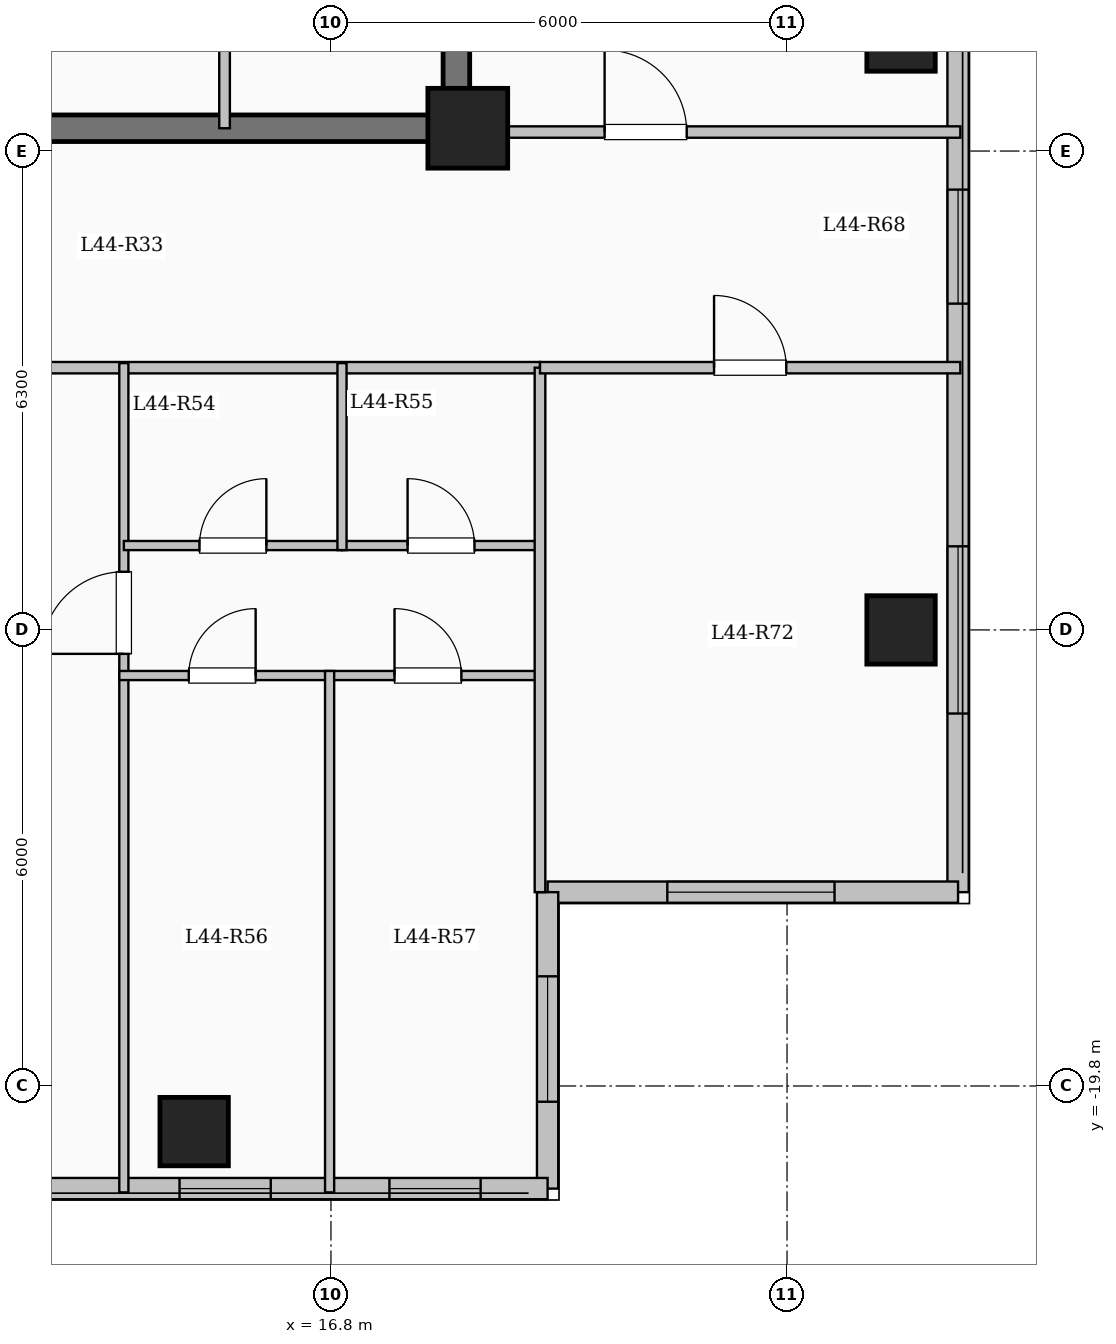
"""IFC4 building model, lengths in metres.
Left out: names, types, materials, properties, quantities, classifications, styles, units other than length and angle.
Written with IfcOpenShell. Run it as: python <this file> out.ifc"""

import sys

from ifc_helpers import new_model, si_unit, direction, frame, frame_2d, origin, origin_2d, place, context, subcontext, project, spatial, rectangle, extrude, element, fill, save


model = new_model("IFC4")
c1 = context("Model", 3, precision=1e-05, world=origin(), true_north=direction((0.0, 1.0)))
c2 = subcontext(c1, "Body", "Model", "MODEL_VIEW")
j1 = project(units=[si_unit("LENGTHUNIT", "METRE"), si_unit("PLANEANGLEUNIT", "RADIAN")], contexts=[c1])
p1 = place(None, origin())
s1 = spatial("IfcSite", under=j1, at=p1, CompositionType="ELEMENT")
p2 = place(p1, origin())
s2 = spatial("IfcBuilding", under=s1, at=p2, CompositionType="ELEMENT")
p3 = place(p2, frame((0.0, 0.0, 162.75)))
s3 = spatial("IfcBuildingStorey", under=s2, at=p3, CompositionType="ELEMENT", Elevation=162.75)
p4 = place(p3, frame((18.6, -7.2, 0.0), z_axis=(0.0, 0.0, 1.0), x_axis=(1.0, 0.0, 0.0)))
e1 = element("IfcColumn", 1, at=p4, inside=s3, PredefinedType="COLUMN", context=c2, shape_type="SweptSolid", body=[
    extrude(rectangle(XDim=1.05, YDim=1.05, at=origin_2d()), origin(), (0.0, 0.0, 1.0), 3.35),
])
for number, where, z_axis, x_axis in (
    (2, (15.0, -20.4, 0.0), (0.0, 0.0, 1.0), (1.0, 0.0, 0.0)),
    (3, (24.3, -13.8, 0.0), (0.0, 0.0, 1.0), (1.0, 0.0, 0.0)),
    (4, (24.3, -6.0, 0.0), (0.0, 0.0, 1.0), (1.0, 0.0, 0.0)),
):
    element("IfcColumn", number, at=place(p3, frame(where, z_axis=z_axis, x_axis=x_axis)), inside=s3, PredefinedType="COLUMN", context=c2, shape_type="SweptSolid", body=[
        extrude(rectangle(XDim=0.9, YDim=0.9, at=origin_2d()), origin(), (0.0, 0.0, 1.0), 3.35),
    ])
p5 = place(p3, frame((25.05, 17.25, 0.0), z_axis=(0.0, 0.0, 1.0), x_axis=(0.0, -1.0, 0.0)))
e5 = element("IfcWall", 5, at=p5, inside=s3, PredefinedType="SOLIDWALL", context=c2, shape_type="SweptSolid", body=[
    extrude(rectangle(XDim=34.5, YDim=0.28, at=frame_2d((17.25, 0.0))), origin(), (0.0, 0.0, 1.0), 3.1),
])
p6 = place(p5, frame((1.375, 0.0, 0.9)))
e6 = element("IfcOpeningElement", 6, at=p6, cuts=e5, PredefinedType="OPENING", context=c2, shape_type="SweptSolid", body=[
    extrude(rectangle(XDim=2.0, YDim=1.7, at=frame_2d((1.0, 0.85))), frame((0.0, 0.15, 0.0), z_axis=(0.0, -1.0, 0.0), x_axis=(1.0, 0.0, 0.0)), (0.0, 0.0, 1.0), 0.3),
])
p7 = place(p5, frame((5.125, 0.0, 0.95)))
e7 = element("IfcOpeningElement", 7, at=p7, cuts=e5, PredefinedType="OPENING", context=c2, shape_type="SweptSolid", body=[
    extrude(rectangle(XDim=1.0, YDim=1.5, at=frame_2d((0.5, 0.75))), frame((0.0, 0.15, 0.0), z_axis=(0.0, -1.0, 0.0), x_axis=(1.0, 0.0, 0.0)), (0.0, 0.0, 1.0), 0.3),
])
p8 = place(p5, frame((14.5, 0.0, 0.9)))
e8 = element("IfcOpeningElement", 8, at=p8, cuts=e5, PredefinedType="OPENING", context=c2, shape_type="SweptSolid", body=[
    extrude(rectangle(XDim=2.0, YDim=1.7, at=frame_2d((1.0, 0.85))), frame((0.0, 0.15, 0.0), z_axis=(0.0, -1.0, 0.0), x_axis=(1.0, 0.0, 0.0)), (0.0, 0.0, 1.0), 0.3),
])
p9 = place(p5, frame((25.258, 0.0, 0.9)))
e9 = element("IfcOpeningElement", 9, at=p9, cuts=e5, PredefinedType="OPENING", context=c2, shape_type="SweptSolid", body=[
    extrude(rectangle(XDim=1.5, YDim=1.65, at=frame_2d((0.75, 0.825))), frame((0.0, 0.15, 0.0), z_axis=(0.0, -1.0, 0.0), x_axis=(1.0, 0.0, 0.0)), (0.0, 0.0, 1.0), 0.3),
])
p10 = place(p5, frame((29.95, 0.0, 0.9)))
e10 = element("IfcOpeningElement", 10, at=p10, cuts=e5, PredefinedType="OPENING", context=c2, shape_type="SweptSolid", body=[
    extrude(rectangle(XDim=2.2, YDim=1.75, at=frame_2d((1.1, 0.875))), frame((0.0, 0.15, 0.0), z_axis=(0.0, -1.0, 0.0), x_axis=(1.0, 0.0, 0.0)), (0.0, 0.0, 1.0), 0.3),
])
p11 = place(p3, frame((25.05, -17.25, 0.0), z_axis=(0.0, 0.0, 1.0), x_axis=(-1.0, 0.0, 0.0)))
e11 = element("IfcWall", 11, at=p11, inside=s3, PredefinedType="SOLIDWALL", context=c2, shape_type="SweptSolid", body=[
    extrude(rectangle(XDim=5.4, YDim=0.28, at=frame_2d((2.7, 0.0))), origin(), (0.0, 0.0, 1.0), 3.1),
])
p12 = place(p11, frame((1.625, 0.0, 0.9)))
e12 = element("IfcOpeningElement", 12, at=p12, cuts=e11, PredefinedType="OPENING", context=c2, shape_type="SweptSolid", body=[
    extrude(rectangle(XDim=2.2, YDim=1.75, at=frame_2d((1.1, 0.875))), frame((0.0, 0.15, 0.0), z_axis=(0.0, -1.0, 0.0), x_axis=(1.0, 0.0, 0.0)), (0.0, 0.0, 1.0), 0.3),
])
p13 = place(p3, frame((19.65, -17.25, 0.0), z_axis=(0.0, 0.0, 1.0), x_axis=(0.0, -1.0, 0.0)))
e13 = element("IfcWall", 13, at=p13, inside=s3, PredefinedType="SOLIDWALL", context=c2, shape_type="SweptSolid", body=[
    extrude(rectangle(XDim=3.9, YDim=0.28, at=frame_2d((1.95, 0.0))), origin(), (0.0, 0.0, 1.0), 3.1),
])
p14 = place(p13, frame((1.107, 0.0, 0.9)))
e14 = element("IfcOpeningElement", 14, at=p14, cuts=e13, PredefinedType="OPENING", context=c2, shape_type="SweptSolid", body=[
    extrude(rectangle(XDim=1.65, YDim=1.6, at=frame_2d((0.825, 0.8))), frame((0.0, 0.15, 0.0), z_axis=(0.0, -1.0, 0.0), x_axis=(1.0, 0.0, 0.0)), (0.0, 0.0, 1.0), 0.3),
])
p15 = place(p3, frame((19.65, -21.15, 0.0), z_axis=(0.0, 0.0, 1.0), x_axis=(-1.0, 0.0, 0.0)))
e15 = element("IfcWall", 15, at=p15, inside=s3, PredefinedType="SOLIDWALL", context=c2, shape_type="SweptSolid", body=[
    extrude(rectangle(XDim=12.3, YDim=0.28, at=frame_2d((6.15, 0.0))), origin(), (0.0, 0.0, 1.0), 3.1),
])
p16 = place(p15, frame((0.881, 0.0, 0.95)))
e16 = element("IfcOpeningElement", 16, at=p16, cuts=e15, PredefinedType="OPENING", context=c2, shape_type="SweptSolid", body=[
    extrude(rectangle(XDim=1.2, YDim=1.5, at=frame_2d((0.6, 0.75))), frame((0.0, 0.15, 0.0), z_axis=(0.0, -1.0, 0.0), x_axis=(1.0, 0.0, 0.0)), (0.0, 0.0, 1.0), 0.3),
])
p17 = place(p15, frame((3.642, 0.0, 0.95)))
e17 = element("IfcOpeningElement", 17, at=p17, cuts=e15, PredefinedType="OPENING", context=c2, shape_type="SweptSolid", body=[
    extrude(rectangle(XDim=1.2, YDim=1.5, at=frame_2d((0.6, 0.75))), frame((0.0, 0.15, 0.0), z_axis=(0.0, -1.0, 0.0), x_axis=(1.0, 0.0, 0.0)), (0.0, 0.0, 1.0), 0.3),
])
p18 = place(p15, frame((7.234, 0.0, 0.9)))
e18 = element("IfcOpeningElement", 18, at=p18, cuts=e15, PredefinedType="OPENING", context=c2, shape_type="SweptSolid", body=[
    extrude(rectangle(XDim=2.2, YDim=1.75, at=frame_2d((1.1, 0.875))), frame((0.0, 0.15, 0.0), z_axis=(0.0, -1.0, 0.0), x_axis=(1.0, 0.0, 0.0)), (0.0, 0.0, 1.0), 0.3),
])
p19 = place(p15, frame((11.303, 0.0, 0.95)))
e19 = element("IfcOpeningElement", 19, at=p19, cuts=e15, PredefinedType="OPENING", context=c2, shape_type="SweptSolid", body=[
    extrude(rectangle(XDim=0.85, YDim=1.5, at=frame_2d((0.425, 0.75))), frame((0.0, 0.15, 0.0), z_axis=(0.0, -1.0, 0.0), x_axis=(1.0, 0.0, 0.0)), (0.0, 0.0, 1.0), 0.3),
])
p20 = place(p3, frame((18.45, -7.375, 0.0), z_axis=(0.0, 0.0, 1.0), x_axis=(0.0, 1.0, 0.0)))
e20 = element("IfcWall", 20, at=p20, inside=s3, PredefinedType="SHEAR", context=c2, shape_type="SweptSolid", body=[
    extrude(rectangle(XDim=14.05, YDim=0.35, at=frame_2d((7.025, 0.0))), origin(), (0.0, 0.0, 1.0), 3.35),
])
p21 = place(p3, frame((10.075, -7.2, 0.0), z_axis=(0.0, 0.0, 1.0), x_axis=(1.0, 0.0, 0.0)))
e21 = element("IfcWall", 21, at=p21, inside=s3, PredefinedType="SHEAR", context=c2, shape_type="SweptSolid", body=[
    extrude(rectangle(XDim=8.55, YDim=0.35, at=frame_2d((4.275, 0.0))), origin(), (0.0, 0.0, 1.0), 3.35),
])
p22 = place(p3, frame((15.4, -7.2, 0.0), z_axis=(0.0, 0.0, 1.0), x_axis=(0.0, 1.0, 0.0)))
e22 = element("IfcWall", 22, at=p22, inside=s3, PredefinedType="PARTITIONING", context=c2, shape_type="SweptSolid", body=[
    extrude(rectangle(XDim=10.45, YDim=0.14, at=frame_2d((5.225, 0.0))), origin(), (0.0, 0.0, 1.0), 3.1),
])
p23 = place(p22, frame((9.25, 0.0, 0.0)))
e23 = element("IfcOpeningElement", 23, at=p23, cuts=e22, PredefinedType="OPENING", context=c2, shape_type="SweptSolid", body=[
    extrude(rectangle(XDim=0.9, YDim=2.08, at=frame_2d((0.45, 1.04))), frame((0.0, 0.08, 0.0), z_axis=(0.0, -1.0, 0.0), x_axis=(1.0, 0.0, 0.0)), (0.0, 0.0, 1.0), 0.16),
])
p24 = place(p3, frame((8.55, -10.35, 0.0), z_axis=(0.0, 0.0, 1.0), x_axis=(1.0, 0.0, 0.0)))
e24 = element("IfcWall", 24, at=p24, inside=s3, PredefinedType="PARTITIONING", context=c2, shape_type="SweptSolid", body=[
    extrude(rectangle(XDim=11.0, YDim=0.15, at=frame_2d((5.5, 0.0))), origin(), (0.0, 0.0, 1.0), 3.1),
])
p25 = place(p24, frame((0.75, 0.0, 0.0)))
e25 = element("IfcOpeningElement", 25, at=p25, cuts=e24, PredefinedType="OPENING", context=c2, shape_type="SweptSolid", body=[
    extrude(rectangle(XDim=0.96, YDim=2.15, at=frame_2d((0.48, 1.075))), frame((0.0, 0.085, 0.0), z_axis=(0.0, -1.0, 0.0), x_axis=(1.0, 0.0, 0.0)), (0.0, 0.0, 1.0), 0.17),
])
p26 = place(p3, frame((14.075, -21.2, 0.0), z_axis=(0.0, 0.0, 1.0), x_axis=(0.0, 1.0, 0.0)))
e26 = element("IfcWall", 26, at=p26, inside=s3, PredefinedType="PARTITIONING", context=c2, shape_type="SweptSolid", body=[
    extrude(rectangle(XDim=10.91, YDim=0.12, at=frame_2d((5.455, 0.0))), origin(), (0.0, 0.0, 1.0), 3.1),
])
p27 = place(p26, frame((7.085, 0.0, 0.0)))
e27 = element("IfcOpeningElement", 27, at=p27, cuts=e26, PredefinedType="OPENING", context=c2, shape_type="SweptSolid", body=[
    extrude(rectangle(XDim=1.08, YDim=2.15, at=frame_2d((0.54, 1.075))), frame((0.0, 0.07, 0.0), z_axis=(0.0, -1.0, 0.0), x_axis=(1.0, 0.0, 0.0)), (0.0, 0.0, 1.0), 0.14),
])
p28 = place(p3, frame((14.075, -12.69, 0.0), z_axis=(0.0, 0.0, 1.0), x_axis=(1.0, 0.0, 0.0)))
e28 = element("IfcWall", 28, at=p28, inside=s3, PredefinedType="PARTITIONING", context=c2, shape_type="SweptSolid", body=[
    extrude(rectangle(XDim=2.87, YDim=0.12, at=frame_2d((1.435, 0.0))), origin(), (0.0, 0.0, 1.0), 3.1),
])
p29 = place(p28, frame((0.995, 0.0, 0.0)))
e29 = element("IfcOpeningElement", 29, at=p29, cuts=e28, PredefinedType="OPENING", context=c2, shape_type="SweptSolid", body=[
    extrude(rectangle(XDim=0.88, YDim=2.1, at=frame_2d((0.44, 1.05))), frame((0.0, 0.07, 0.0), z_axis=(0.0, -1.0, 0.0), x_axis=(1.0, 0.0, 0.0)), (0.0, 0.0, 1.0), 0.14),
])
p30 = place(p3, frame((16.945, -12.69, 0.0), z_axis=(0.0, 0.0, 1.0), x_axis=(1.0, 0.0, 0.0)))
e30 = element("IfcWall", 30, at=p30, inside=s3, PredefinedType="PARTITIONING", context=c2, shape_type="SweptSolid", body=[
    extrude(rectangle(XDim=2.605, YDim=0.12, at=frame_2d((1.302, 0.0))), origin(), (0.0, 0.0, 1.0), 3.1),
])
p31 = place(p30, frame((0.863, 0.0, 0.0)))
e31 = element("IfcOpeningElement", 31, at=p31, cuts=e30, PredefinedType="OPENING", context=c2, shape_type="SweptSolid", body=[
    extrude(rectangle(XDim=0.88, YDim=2.1, at=frame_2d((0.44, 1.05))), frame((0.0, 0.07, 0.0), z_axis=(0.0, -1.0, 0.0), x_axis=(1.0, 0.0, 0.0)), (0.0, 0.0, 1.0), 0.14),
])
p32 = place(p3, frame((14.015, -14.4, 0.0), z_axis=(0.0, 0.0, 1.0), x_axis=(1.0, 0.0, 0.0)))
e32 = element("IfcWall", 32, at=p32, inside=s3, PredefinedType="PARTITIONING", context=c2, shape_type="SweptSolid", body=[
    extrude(rectangle(XDim=5.595, YDim=0.12, at=frame_2d((2.798, 0.0))), origin(), (0.0, 0.0, 1.0), 3.1),
])
p33 = place(p32, frame((0.914, 0.0, 0.0)))
e33 = element("IfcOpeningElement", 33, at=p33, cuts=e32, PredefinedType="OPENING", context=c2, shape_type="SweptSolid", body=[
    extrude(rectangle(XDim=0.88, YDim=2.1, at=frame_2d((0.44, 1.05))), frame((0.0, 0.07, 0.0), z_axis=(0.0, -1.0, 0.0), x_axis=(1.0, 0.0, 0.0)), (0.0, 0.0, 1.0), 0.14),
])
p34 = place(p32, frame((3.621, 0.0, 0.0)))
e34 = element("IfcOpeningElement", 34, at=p34, cuts=e32, PredefinedType="OPENING", context=c2, shape_type="SweptSolid", body=[
    extrude(rectangle(XDim=0.88, YDim=2.1, at=frame_2d((0.44, 1.05))), frame((0.0, 0.07, 0.0), z_axis=(0.0, -1.0, 0.0), x_axis=(1.0, 0.0, 0.0)), (0.0, 0.0, 1.0), 0.14),
])
p35 = place(p3, frame((16.945, -12.75, 0.0), z_axis=(0.0, 0.0, 1.0), x_axis=(0.0, 1.0, 0.0)))
e35 = element("IfcWall", 35, at=p35, inside=s3, PredefinedType="PARTITIONING", context=c2, shape_type="SweptSolid", body=[
    extrude(rectangle(XDim=2.46, YDim=0.12, at=frame_2d((1.23, 0.0))), origin(), (0.0, 0.0, 1.0), 3.1),
])
p36 = place(p3, frame((16.782, -21.2, 0.0), z_axis=(0.0, 0.0, 1.0), x_axis=(0.0, 1.0, 0.0)))
e36 = element("IfcWall", 36, at=p36, inside=s3, PredefinedType="PARTITIONING", context=c2, shape_type="SweptSolid", body=[
    extrude(rectangle(XDim=6.86, YDim=0.12, at=frame_2d((3.43, 0.0))), origin(), (0.0, 0.0, 1.0), 3.1),
])
p37 = place(p3, frame((18.45, -7.25, 0.0), z_axis=(0.0, 0.0, 1.0), x_axis=(1.0, 0.0, 0.0)))
e37 = element("IfcWall", 37, at=p37, inside=s3, PredefinedType="PARTITIONING", context=c2, shape_type="SweptSolid", body=[
    extrude(rectangle(XDim=6.63, YDim=0.15, at=frame_2d((3.315, 0.0))), origin(), (0.0, 0.0, 1.0), 3.1),
])
p38 = place(p37, frame((1.95, 0.0, 0.0)))
e38 = element("IfcOpeningElement", 38, at=p38, cuts=e37, PredefinedType="OPENING", context=c2, shape_type="SweptSolid", body=[
    extrude(rectangle(XDim=1.08, YDim=2.15, at=frame_2d((0.54, 1.075))), frame((0.0, 0.085, 0.0), z_axis=(0.0, -1.0, 0.0), x_axis=(1.0, 0.0, 0.0)), (0.0, 0.0, 1.0), 0.17),
])
p39 = place(p3, frame((19.55, -17.25, 0.0), z_axis=(0.0, 0.0, 1.0), x_axis=(0.0, 1.0, 0.0)))
e39 = element("IfcWall", 39, at=p39, inside=s3, PredefinedType="PARTITIONING", context=c2, shape_type="SweptSolid", body=[
    extrude(rectangle(XDim=6.9, YDim=0.14, at=frame_2d((3.45, 0.0))), origin(), (0.0, 0.0, 1.0), 3.1),
])
p40 = place(p3, frame((19.55, -10.35, 0.0), z_axis=(0.0, 0.0, 1.0), x_axis=(1.0, 0.0, 0.0)))
e40 = element("IfcWall", 40, at=p40, inside=s3, PredefinedType="PARTITIONING", context=c2, shape_type="SweptSolid", body=[
    extrude(rectangle(XDim=5.53, YDim=0.15, at=frame_2d((2.765, 0.0))), origin(), (0.0, 0.0, 1.0), 3.1),
])
p41 = place(p40, frame((2.29, 0.0, 0.0)))
e41 = element("IfcOpeningElement", 41, at=p41, cuts=e40, PredefinedType="OPENING", context=c2, shape_type="SweptSolid", body=[
    extrude(rectangle(XDim=0.95, YDim=2.15, at=frame_2d((0.475, 1.075))), frame((0.0, 0.085, 0.0), z_axis=(0.0, -1.0, 0.0), x_axis=(1.0, 0.0, 0.0)), (0.0, 0.0, 1.0), 0.17),
])
p42 = place(p9, origin())
e42 = element("IfcWindow", 42, at=p42, inside=s3, PartitioningType="SINGLE_PANEL", PredefinedType="WINDOW", context=c2, shape_type="SweptSolid", body=[
    extrude(rectangle(XDim=1.5, YDim=1.65, at=frame_2d((0.75, 0.825))), frame((0.0, 0.03, 0.0), z_axis=(0.0, -1.0, 0.0), x_axis=(1.0, 0.0, 0.0)), (0.0, 0.0, 1.0), 0.06),
])
fill(e9, e42)
p43 = place(p10, origin())
e43 = element("IfcWindow", 43, at=p43, inside=s3, PartitioningType="SINGLE_PANEL", PredefinedType="WINDOW", context=c2, shape_type="SweptSolid", body=[
    extrude(rectangle(XDim=2.2, YDim=1.75, at=frame_2d((1.1, 0.875))), frame((0.0, 0.03, 0.0), z_axis=(0.0, -1.0, 0.0), x_axis=(1.0, 0.0, 0.0)), (0.0, 0.0, 1.0), 0.06),
])
fill(e10, e43)
p44 = place(p12, origin())
e44 = element("IfcWindow", 44, at=p44, inside=s3, PartitioningType="SINGLE_PANEL", PredefinedType="WINDOW", context=c2, shape_type="SweptSolid", body=[
    extrude(rectangle(XDim=2.2, YDim=1.75, at=frame_2d((1.1, 0.875))), frame((0.0, 0.03, 0.0), z_axis=(0.0, -1.0, 0.0), x_axis=(1.0, 0.0, 0.0)), (0.0, 0.0, 1.0), 0.06),
])
fill(e12, e44)
p45 = place(p14, origin())
e45 = element("IfcWindow", 45, at=p45, inside=s3, PartitioningType="SINGLE_PANEL", PredefinedType="WINDOW", context=c2, shape_type="SweptSolid", body=[
    extrude(rectangle(XDim=1.65, YDim=1.6, at=frame_2d((0.825, 0.8))), frame((0.0, 0.03, 0.0), z_axis=(0.0, -1.0, 0.0), x_axis=(1.0, 0.0, 0.0)), (0.0, 0.0, 1.0), 0.06),
])
fill(e14, e45)
p46 = place(p16, origin())
e46 = element("IfcWindow", 46, at=p46, inside=s3, PartitioningType="SINGLE_PANEL", PredefinedType="WINDOW", context=c2, shape_type="SweptSolid", body=[
    extrude(rectangle(XDim=1.2, YDim=1.5, at=frame_2d((0.6, 0.75))), frame((0.0, 0.03, 0.0), z_axis=(0.0, -1.0, 0.0), x_axis=(1.0, 0.0, 0.0)), (0.0, 0.0, 1.0), 0.06),
])
fill(e16, e46)
p47 = place(p17, origin())
e47 = element("IfcWindow", 47, at=p47, inside=s3, PartitioningType="SINGLE_PANEL", PredefinedType="WINDOW", context=c2, shape_type="SweptSolid", body=[
    extrude(rectangle(XDim=1.2, YDim=1.5, at=frame_2d((0.6, 0.75))), frame((0.0, 0.03, 0.0), z_axis=(0.0, -1.0, 0.0), x_axis=(1.0, 0.0, 0.0)), (0.0, 0.0, 1.0), 0.06),
])
fill(e17, e47)
p48 = place(p27, origin())
e48 = element("IfcDoor", 48, at=p48, inside=s3, OperationType="SINGLE_SWING_LEFT", PredefinedType="DOOR", context=c2, shape_type="SweptSolid", body=[
    extrude(rectangle(XDim=1.08, YDim=2.15, at=frame_2d((0.54, 1.075))), frame((0.0, 0.025, 0.0), z_axis=(0.0, -1.0, 0.0), x_axis=(1.0, 0.0, 0.0)), (0.0, 0.0, 1.0), 0.05),
])
fill(e27, e48)
p49 = place(p29, origin())
e49 = element("IfcDoor", 49, at=p49, inside=s3, OperationType="SINGLE_SWING_RIGHT", PredefinedType="DOOR", context=c2, shape_type="SweptSolid", body=[
    extrude(rectangle(XDim=0.88, YDim=2.1, at=frame_2d((0.44, 1.05))), frame((0.0, 0.025, 0.0), z_axis=(0.0, -1.0, 0.0), x_axis=(1.0, 0.0, 0.0)), (0.0, 0.0, 1.0), 0.05),
])
fill(e29, e49)
p50 = place(p31, origin())
e50 = element("IfcDoor", 50, at=p50, inside=s3, OperationType="SINGLE_SWING_LEFT", PredefinedType="DOOR", context=c2, shape_type="SweptSolid", body=[
    extrude(rectangle(XDim=0.88, YDim=2.1, at=frame_2d((0.44, 1.05))), frame((0.0, 0.025, 0.0), z_axis=(0.0, -1.0, 0.0), x_axis=(1.0, 0.0, 0.0)), (0.0, 0.0, 1.0), 0.05),
])
fill(e31, e50)
p51 = place(p33, origin())
e51 = element("IfcDoor", 51, at=p51, inside=s3, OperationType="SINGLE_SWING_RIGHT", PredefinedType="DOOR", context=c2, shape_type="SweptSolid", body=[
    extrude(rectangle(XDim=0.88, YDim=2.1, at=frame_2d((0.44, 1.05))), frame((0.0, 0.025, 0.0), z_axis=(0.0, -1.0, 0.0), x_axis=(1.0, 0.0, 0.0)), (0.0, 0.0, 1.0), 0.05),
])
fill(e33, e51)
p52 = place(p34, origin())
e52 = element("IfcDoor", 52, at=p52, inside=s3, OperationType="SINGLE_SWING_LEFT", PredefinedType="DOOR", context=c2, shape_type="SweptSolid", body=[
    extrude(rectangle(XDim=0.88, YDim=2.1, at=frame_2d((0.44, 1.05))), frame((0.0, 0.025, 0.0), z_axis=(0.0, -1.0, 0.0), x_axis=(1.0, 0.0, 0.0)), (0.0, 0.0, 1.0), 0.05),
])
fill(e34, e52)
p53 = place(p41, origin())
e53 = element("IfcDoor", 53, at=p53, inside=s3, OperationType="SINGLE_SWING_LEFT", PredefinedType="DOOR", context=c2, shape_type="SweptSolid", body=[
    extrude(rectangle(XDim=0.95, YDim=2.15, at=frame_2d((0.475, 1.075))), frame((0.0, 0.025, 0.0), z_axis=(0.0, -1.0, 0.0), x_axis=(1.0, 0.0, 0.0)), (0.0, 0.0, 1.0), 0.05),
])
fill(e41, e53)
p54 = place(p38, origin())
e54 = element("IfcDoor", 54, at=p54, inside=s3, OperationType="SINGLE_SWING_LEFT", PredefinedType="DOOR", context=c2, shape_type="SweptSolid", body=[
    extrude(rectangle(XDim=1.08, YDim=2.15, at=frame_2d((0.54, 1.075))), frame((0.0, 0.025, 0.0), z_axis=(0.0, -1.0, 0.0), x_axis=(1.0, 0.0, 0.0)), (0.0, 0.0, 1.0), 0.05),
])
fill(e38, e54)
save(model, sys.argv[1])
